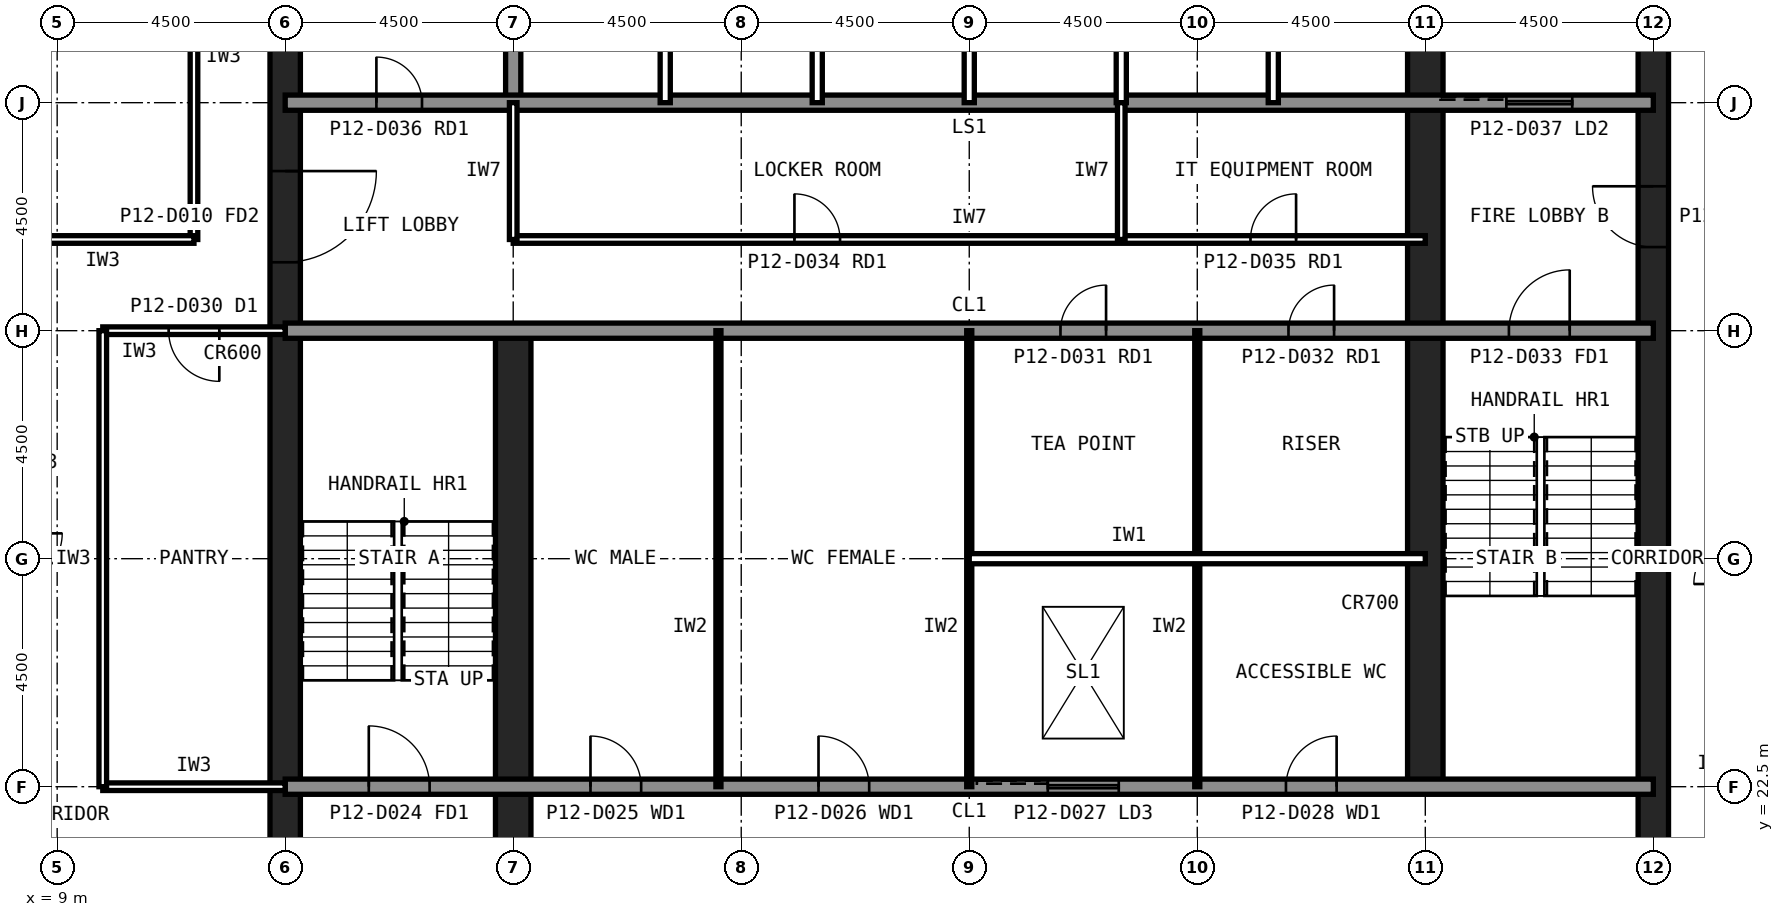
"""IFC4 building model, lengths in metres.
Left out: names, types, materials, properties, quantities, classifications, styles, units other than length and angle.
Written with IfcOpenShell. Run it as: python <this file> out.ifc"""

import sys

from ifc_helpers import new_model, si_unit, direction, frame, frame_2d, origin, place, context, subcontext, project, spatial, rectangle, extrude, element, fill, save


model = new_model("IFC4")
c1 = context("Model", 3, precision=1e-05, world=origin(), true_north=direction((0.0, 1.0)))
c2 = subcontext(c1, "Body", "Model", "MODEL_VIEW")
j1 = project(units=[si_unit("LENGTHUNIT", "METRE"), si_unit("PLANEANGLEUNIT", "RADIAN")], contexts=[c1])
p1 = place(None, origin())
s1 = spatial("IfcSite", under=j1, at=p1, CompositionType="ELEMENT")
p2 = place(p1, origin())
s2 = spatial("IfcBuilding", under=s1, at=p2, CompositionType="ELEMENT")
p3 = place(p2, frame((0.0, 0.0, 54.2)))
s3 = spatial("IfcBuildingStorey", under=s2, at=p3, CompositionType="ELEMENT", Elevation=54.2)
p4 = place(p3, frame((40.5, 13.5, 0.0), z_axis=(0.0, 0.0, 1.0), x_axis=(0.0, 1.0, 0.0)))
e1 = element("IfcWall", 1, at=p4, inside=s3, PredefinedType="SHEAR", context=c2, shape_type="SweptSolid", body=[
    extrude(rectangle(XDim=27.0, YDim=0.6, at=frame_2d((13.5, 0.0))), origin(), (0.0, 0.0, 1.0), 4.2),
])
p5 = place(p4, frame((5.85, 0.0, 0.0)))
e2 = element("IfcOpeningElement", 2, at=p5, cuts=e1, PredefinedType="OPENING", context=c2, shape_type="SweptSolid", body=[
    extrude(rectangle(XDim=1.8, YDim=2.1, at=frame_2d((0.9, 1.05))), frame((0.0, 0.31, 0.0), z_axis=(0.0, -1.0, 0.0), x_axis=(1.0, 0.0, 0.0)), (0.0, 0.0, 1.0), 0.62),
])
p6 = place(p4, frame((19.65, 0.0, 0.0)))
e3 = element("IfcOpeningElement", 3, at=p6, cuts=e1, PredefinedType="OPENING", context=c2, shape_type="SweptSolid", body=[
    extrude(rectangle(XDim=1.2, YDim=2.1, at=frame_2d((0.6, 1.05))), frame((0.0, 0.31, 0.0), z_axis=(0.0, -1.0, 0.0), x_axis=(1.0, 0.0, 0.0)), (0.0, 0.0, 1.0), 0.62),
])
p7 = place(p3, frame((13.5, 40.5, 0.0), z_axis=(0.0, 0.0, 1.0), x_axis=(0.0, -1.0, 0.0)))
e4 = element("IfcWall", 4, at=p7, inside=s3, PredefinedType="SHEAR", context=c2, shape_type="SweptSolid", body=[
    extrude(rectangle(XDim=27.0, YDim=0.6, at=frame_2d((13.5, 0.0))), origin(), (0.0, 0.0, 1.0), 4.2),
])
p8 = place(p7, frame((19.65, 0.0, 0.0)))
e5 = element("IfcOpeningElement", 5, at=p8, cuts=e4, PredefinedType="OPENING", context=c2, shape_type="SweptSolid", body=[
    extrude(rectangle(XDim=1.2, YDim=2.1, at=frame_2d((0.6, 1.05))), frame((0.0, 0.31, 0.0), z_axis=(0.0, -1.0, 0.0), x_axis=(1.0, 0.0, 0.0)), (0.0, 0.0, 1.0), 0.62),
])
p9 = place(p7, frame((5.85, 0.0, 0.0)))
e6 = element("IfcOpeningElement", 6, at=p9, cuts=e4, PredefinedType="OPENING", context=c2, shape_type="SweptSolid", body=[
    extrude(rectangle(XDim=1.8, YDim=2.1, at=frame_2d((0.9, 1.05))), frame((0.0, 0.31, 0.0), z_axis=(0.0, -1.0, 0.0), x_axis=(1.0, 0.0, 0.0)), (0.0, 0.0, 1.0), 0.62),
])
p10 = place(p3, frame((18.0, 13.5, 0.0), z_axis=(0.0, 0.0, 1.0), x_axis=(0.0, 1.0, 0.0)))
e7 = element("IfcWall", 7, at=p10, inside=s3, PredefinedType="SHEAR", context=c2, shape_type="SweptSolid", body=[
    extrude(rectangle(XDim=18.0, YDim=0.7, at=frame_2d((9.0, 0.0))), origin(), (0.0, 0.0, 1.0), 4.2),
])
p11 = place(p3, frame((18.0, 36.0, 0.0), z_axis=(0.0, 0.0, 1.0), x_axis=(0.0, 1.0, 0.0)))
e8 = element("IfcWall", 8, at=p11, inside=s3, PredefinedType="SOLIDWALL", context=c2, shape_type="SweptSolid", body=[
    extrude(rectangle(XDim=4.5, YDim=0.3, at=frame_2d((2.25, 0.0))), origin(), (0.0, 0.0, 1.0), 4.04),
])
p12 = place(p3, frame((36.0, 22.5, 0.0), z_axis=(0.0, 0.0, 1.0), x_axis=(0.0, 1.0, 0.0)))
e9 = element("IfcWall", 9, at=p12, inside=s3, PredefinedType="SHEAR", context=c2, shape_type="SweptSolid", body=[
    extrude(rectangle(XDim=18.0, YDim=0.7, at=frame_2d((9.0, 0.0))), origin(), (0.0, 0.0, 1.0), 4.2),
])
p13 = place(p3, frame((13.5, 36.0, 0.0), z_axis=(0.0, 0.0, 1.0), x_axis=(1.0, 0.0, 0.0)))
e10 = element("IfcWall", 10, at=p13, inside=s3, PredefinedType="SOLIDWALL", context=c2, shape_type="SweptSolid", body=[
    extrude(rectangle(XDim=27.0, YDim=0.3, at=frame_2d((13.5, 0.0))), origin(), (0.0, 0.0, 1.0), 4.04),
])
p14 = place(p13, frame((1.8, 0.0, 0.0)))
e11 = element("IfcOpeningElement", 11, at=p14, cuts=e10, PredefinedType="OPENING", context=c2, shape_type="SweptSolid", body=[
    extrude(rectangle(XDim=0.9, YDim=2.1, at=frame_2d((0.45, 1.05))), frame((0.0, 0.16, 0.0), z_axis=(0.0, -1.0, 0.0), x_axis=(1.0, 0.0, 0.0)), (0.0, 0.0, 1.0), 0.32),
])
p15 = place(p13, frame((24.1, 0.0, 0.0)))
e12 = element("IfcOpeningElement", 12, at=p15, cuts=e10, PredefinedType="OPENING", context=c2, shape_type="SweptSolid", body=[
    extrude(rectangle(XDim=1.3, YDim=2.2, at=frame_2d((0.65, 1.1))), frame((0.0, 0.16, 0.0), z_axis=(0.0, -1.0, 0.0), x_axis=(1.0, 0.0, 0.0)), (0.0, 0.0, 1.0), 0.32),
])
p16 = place(p3, frame((13.5, 22.5, 0.0), z_axis=(0.0, 0.0, 1.0), x_axis=(1.0, 0.0, 0.0)))
e13 = element("IfcWall", 13, at=p16, inside=s3, PredefinedType="SOLIDWALL", context=c2, shape_type="SweptSolid", body=[
    extrude(rectangle(XDim=27.0, YDim=0.3, at=frame_2d((13.5, 0.0))), origin(), (0.0, 0.0, 1.0), 4.04),
])
p17 = place(p16, frame((1.65, 0.0, 0.0)))
e14 = element("IfcOpeningElement", 14, at=p17, cuts=e13, PredefinedType="OPENING", context=c2, shape_type="SweptSolid", body=[
    extrude(rectangle(XDim=1.2, YDim=2.1, at=frame_2d((0.6, 1.05))), frame((0.0, 0.16, 0.0), z_axis=(0.0, -1.0, 0.0), x_axis=(1.0, 0.0, 0.0)), (0.0, 0.0, 1.0), 0.32),
])
p18 = place(p16, frame((6.025, 0.0, 0.0)))
e15 = element("IfcOpeningElement", 15, at=p18, cuts=e13, PredefinedType="OPENING", context=c2, shape_type="SweptSolid", body=[
    extrude(rectangle(XDim=1.0, YDim=2.1, at=frame_2d((0.5, 1.05))), frame((0.0, 0.16, 0.0), z_axis=(0.0, -1.0, 0.0), x_axis=(1.0, 0.0, 0.0)), (0.0, 0.0, 1.0), 0.32),
])
p19 = place(p16, frame((10.525, 0.0, 0.0)))
e16 = element("IfcOpeningElement", 16, at=p19, cuts=e13, PredefinedType="OPENING", context=c2, shape_type="SweptSolid", body=[
    extrude(rectangle(XDim=1.0, YDim=2.1, at=frame_2d((0.5, 1.05))), frame((0.0, 0.16, 0.0), z_axis=(0.0, -1.0, 0.0), x_axis=(1.0, 0.0, 0.0)), (0.0, 0.0, 1.0), 0.32),
])
p20 = place(p16, frame((19.75, 0.0, 0.0)))
e17 = element("IfcOpeningElement", 17, at=p20, cuts=e13, PredefinedType="OPENING", context=c2, shape_type="SweptSolid", body=[
    extrude(rectangle(XDim=1.0, YDim=2.1, at=frame_2d((0.5, 1.05))), frame((0.0, 0.16, 0.0), z_axis=(0.0, -1.0, 0.0), x_axis=(1.0, 0.0, 0.0)), (0.0, 0.0, 1.0), 0.32),
])
p21 = place(p16, frame((15.05, 0.0, 0.0)))
e18 = element("IfcOpeningElement", 18, at=p21, cuts=e13, PredefinedType="OPENING", context=c2, shape_type="SweptSolid", body=[
    extrude(rectangle(XDim=1.4, YDim=2.4, at=frame_2d((0.7, 1.2))), frame((0.0, 0.16, 0.0), z_axis=(0.0, -1.0, 0.0), x_axis=(1.0, 0.0, 0.0)), (0.0, 0.0, 1.0), 0.32),
])
p22 = place(p3, frame((13.5, 31.5, 0.0), z_axis=(0.0, 0.0, 1.0), x_axis=(1.0, 0.0, 0.0)))
e19 = element("IfcWall", 19, at=p22, inside=s3, PredefinedType="SOLIDWALL", context=c2, shape_type="SweptSolid", body=[
    extrude(rectangle(XDim=27.0, YDim=0.3, at=frame_2d((13.5, 0.0))), origin(), (0.0, 0.0, 1.0), 4.04),
])
p23 = place(p22, frame((24.15, 0.0, 0.0)))
e20 = element("IfcOpeningElement", 20, at=p23, cuts=e19, PredefinedType="OPENING", context=c2, shape_type="SweptSolid", body=[
    extrude(rectangle(XDim=1.2, YDim=2.1, at=frame_2d((0.6, 1.05))), frame((0.0, 0.16, 0.0), z_axis=(0.0, -1.0, 0.0), x_axis=(1.0, 0.0, 0.0)), (0.0, 0.0, 1.0), 0.32),
])
p24 = place(p22, frame((15.3, 0.0, 0.0)))
e21 = element("IfcOpeningElement", 21, at=p24, cuts=e19, PredefinedType="OPENING", context=c2, shape_type="SweptSolid", body=[
    extrude(rectangle(XDim=0.9, YDim=2.1, at=frame_2d((0.45, 1.05))), frame((0.0, 0.16, 0.0), z_axis=(0.0, -1.0, 0.0), x_axis=(1.0, 0.0, 0.0)), (0.0, 0.0, 1.0), 0.32),
])
p25 = place(p22, frame((19.8, 0.0, 0.0)))
e22 = element("IfcOpeningElement", 22, at=p25, cuts=e19, PredefinedType="OPENING", context=c2, shape_type="SweptSolid", body=[
    extrude(rectangle(XDim=0.9, YDim=2.1, at=frame_2d((0.45, 1.05))), frame((0.0, 0.16, 0.0), z_axis=(0.0, -1.0, 0.0), x_axis=(1.0, 0.0, 0.0)), (0.0, 0.0, 1.0), 0.32),
])
for number, where, z_axis, x_axis in (
    (23, (21.0, 36.0, 0.0), (0.0, 0.0, 1.0), (0.0, 1.0, 0.0)),
    (24, (24.0, 36.0, 0.0), (0.0, 0.0, 1.0), (0.0, 1.0, 0.0)),
    (25, (27.0, 36.0, 0.0), (0.0, 0.0, 1.0), (0.0, 1.0, 0.0)),
    (26, (30.0, 36.0, 0.0), (0.0, 0.0, 1.0), (0.0, 1.0, 0.0)),
    (27, (33.0, 36.0, 0.0), (0.0, 0.0, 1.0), (0.0, 1.0, 0.0)),
):
    element("IfcWall", number, at=place(p3, frame(where, z_axis=z_axis, x_axis=x_axis)), inside=s3, PredefinedType="PARTITIONING", context=c2, shape_type="SweptSolid", body=[
        extrude(rectangle(XDim=4.5, YDim=0.2, at=frame_2d((2.25, 0.0))), origin(), (0.0, 0.0, 1.0), 4.04),
    ])
for number, where, z_axis, x_axis in (
    (28, (22.05, 22.5, 0.0), (0.0, 0.0, 1.0), (0.0, 1.0, 0.0)),
    (29, (27.0, 22.5, 0.0), (0.0, 0.0, 1.0), (0.0, 1.0, 0.0)),
    (30, (31.5, 22.5, 0.0), (0.0, 0.0, 1.0), (0.0, 1.0, 0.0)),
):
    element("IfcWall", number, at=place(p3, frame(where, z_axis=z_axis, x_axis=x_axis)), inside=s3, PredefinedType="PLUMBINGWALL", context=c2, shape_type="SweptSolid", body=[
        extrude(rectangle(XDim=9.0, YDim=0.1, at=frame_2d((4.5, 0.0))), origin(), (0.0, 0.0, 1.0), 4.04),
    ])
p26 = place(p3, frame((27.0, 27.0, 0.0), z_axis=(0.0, 0.0, 1.0), x_axis=(1.0, 0.0, 0.0)))
e31 = element("IfcWall", 31, at=p26, inside=s3, PredefinedType="PARTITIONING", context=c2, shape_type="SweptSolid", body=[
    extrude(rectangle(XDim=9.0, YDim=0.2, at=frame_2d((4.5, 0.0))), origin(), (0.0, 0.0, 1.0), 4.04),
])
p27 = place(p3, frame((18.0, 33.3, 0.0), z_axis=(0.0, 0.0, 1.0), x_axis=(1.0, 0.0, 0.0)))
e32 = element("IfcWall", 32, at=p27, inside=s3, PredefinedType="PARTITIONING", context=c2, shape_type="SweptSolid", body=[
    extrude(rectangle(XDim=18.0, YDim=0.15, at=frame_2d((9.0, 0.0))), origin(), (0.0, 0.0, 1.0), 4.04),
])
p28 = place(p27, frame((5.55, 0.0, 0.0)))
e33 = element("IfcOpeningElement", 33, at=p28, cuts=e32, PredefinedType="OPENING", context=c2, shape_type="SweptSolid", body=[
    extrude(rectangle(XDim=0.9, YDim=2.1, at=frame_2d((0.45, 1.05))), frame((0.0, 0.085, 0.0), z_axis=(0.0, -1.0, 0.0), x_axis=(1.0, 0.0, 0.0)), (0.0, 0.0, 1.0), 0.17),
])
p29 = place(p27, frame((14.55, 0.0, 0.0)))
e34 = element("IfcOpeningElement", 34, at=p29, cuts=e32, PredefinedType="OPENING", context=c2, shape_type="SweptSolid", body=[
    extrude(rectangle(XDim=0.9, YDim=2.1, at=frame_2d((0.45, 1.05))), frame((0.0, 0.085, 0.0), z_axis=(0.0, -1.0, 0.0), x_axis=(1.0, 0.0, 0.0)), (0.0, 0.0, 1.0), 0.17),
])
for number, where, z_axis, x_axis in (
    (35, (18.0, 33.3, 0.0), (0.0, 0.0, 1.0), (0.0, 1.0, 0.0)),
    (36, (30.0, 33.3, 0.0), (0.0, 0.0, 1.0), (0.0, 1.0, 0.0)),
):
    element("IfcWall", number, at=place(p3, frame(where, z_axis=z_axis, x_axis=x_axis)), inside=s3, PredefinedType="PARTITIONING", context=c2, shape_type="SweptSolid", body=[
        extrude(rectangle(XDim=2.7, YDim=0.15, at=frame_2d((1.35, 0.0))), origin(), (0.0, 0.0, 1.0), 4.04),
    ])
p30 = place(p3, frame((11.7, 40.5, 0.0), z_axis=(0.0, 0.0, 1.0), x_axis=(0.0, -1.0, 0.0)))
e37 = element("IfcWall", 37, at=p30, inside=s3, PredefinedType="PARTITIONING", context=c2, shape_type="SweptSolid", body=[
    extrude(rectangle(XDim=7.2, YDim=0.15, at=frame_2d((3.6, 0.0))), origin(), (0.0, 0.0, 1.0), 4.04),
])
p31 = place(p3, frame((11.7, 33.3, 0.0), z_axis=(0.0, 0.0, 1.0), x_axis=(-1.0, 0.0, 0.0)))
e38 = element("IfcWall", 38, at=p31, inside=s3, PredefinedType="PARTITIONING", context=c2, shape_type="SweptSolid", body=[
    extrude(rectangle(XDim=3.6, YDim=0.15, at=frame_2d((1.8, 0.0))), origin(), (0.0, 0.0, 1.0), 4.04),
])
p32 = place(p3, frame((9.9, 22.5, 0.0), z_axis=(0.0, 0.0, 1.0), x_axis=(1.0, 0.0, 0.0)))
e39 = element("IfcWall", 39, at=p32, inside=s3, PredefinedType="PARTITIONING", context=c2, shape_type="SweptSolid", body=[
    extrude(rectangle(XDim=3.6, YDim=0.15, at=frame_2d((1.8, 0.0))), origin(), (0.0, 0.0, 1.0), 3.189),
])
p33 = place(p3, frame((13.5, 31.5, 0.0), z_axis=(0.0, 0.0, 1.0), x_axis=(-1.0, 0.0, 0.0)))
e40 = element("IfcWall", 40, at=p33, inside=s3, PredefinedType="PARTITIONING", context=c2, shape_type="SweptSolid", body=[
    extrude(rectangle(XDim=3.6, YDim=0.15, at=frame_2d((1.8, 0.0))), origin(), (0.0, 0.0, 1.0), 3.189),
])
p34 = place(p33, frame((1.3, 0.0, 0.0)))
e41 = element("IfcOpeningElement", 41, at=p34, cuts=e40, PredefinedType="OPENING", context=c2, shape_type="SweptSolid", body=[
    extrude(rectangle(XDim=1.0, YDim=2.1, at=frame_2d((0.5, 1.05))), frame((0.0, 0.085, 0.0), z_axis=(0.0, -1.0, 0.0), x_axis=(1.0, 0.0, 0.0)), (0.0, 0.0, 1.0), 0.17),
])
p35 = place(p3, frame((9.9, 31.5, 0.0), z_axis=(0.0, 0.0, 1.0), x_axis=(0.0, -1.0, 0.0)))
e42 = element("IfcWall", 42, at=p35, inside=s3, PredefinedType="PARTITIONING", context=c2, shape_type="SweptSolid", body=[
    extrude(rectangle(XDim=9.0, YDim=0.15, at=frame_2d((4.5, 0.0))), origin(), (0.0, 0.0, 1.0), 4.04),
])
p36 = place(p9, origin())
e43 = element("IfcDoor", 43, at=p36, inside=s3, OperationType="SINGLE_SWING_LEFT", PredefinedType="DOOR", context=c2, shape_type="SweptSolid", body=[
    extrude(rectangle(XDim=1.8, YDim=2.1, at=frame_2d((0.9, 1.05))), frame((0.0, 0.025, 0.0), z_axis=(0.0, -1.0, 0.0), x_axis=(1.0, 0.0, 0.0)), (0.0, 0.0, 1.0), 0.05),
])
fill(e6, e43)
p37 = place(p6, origin())
e44 = element("IfcDoor", 44, at=p37, inside=s3, OperationType="SINGLE_SWING_RIGHT", PredefinedType="DOOR", context=c2, shape_type="SweptSolid", body=[
    extrude(rectangle(XDim=1.2, YDim=2.1, at=frame_2d((0.6, 1.05))), frame((0.0, 0.025, 0.0), z_axis=(0.0, -1.0, 0.0), x_axis=(1.0, 0.0, 0.0)), (0.0, 0.0, 1.0), 0.05),
])
fill(e3, e44)
p38 = place(p17, origin())
e45 = element("IfcDoor", 45, at=p38, inside=s3, OperationType="SINGLE_SWING_LEFT", PredefinedType="DOOR", context=c2, shape_type="SweptSolid", body=[
    extrude(rectangle(XDim=1.2, YDim=2.1, at=frame_2d((0.6, 1.05))), frame((0.0, 0.025, 0.0), z_axis=(0.0, -1.0, 0.0), x_axis=(1.0, 0.0, 0.0)), (0.0, 0.0, 1.0), 0.05),
])
fill(e14, e45)
p39 = place(p23, origin())
e46 = element("IfcDoor", 46, at=p39, inside=s3, OperationType="SINGLE_SWING_RIGHT", PredefinedType="DOOR", context=c2, shape_type="SweptSolid", body=[
    extrude(rectangle(XDim=1.2, YDim=2.1, at=frame_2d((0.6, 1.05))), frame((0.0, 0.025, 0.0), z_axis=(0.0, -1.0, 0.0), x_axis=(1.0, 0.0, 0.0)), (0.0, 0.0, 1.0), 0.05),
])
fill(e20, e46)
p40 = place(p18, origin())
e47 = element("IfcDoor", 47, at=p40, inside=s3, OperationType="SINGLE_SWING_LEFT", PredefinedType="DOOR", context=c2, shape_type="SweptSolid", body=[
    extrude(rectangle(XDim=1.0, YDim=2.1, at=frame_2d((0.5, 1.05))), frame((0.0, 0.025, 0.0), z_axis=(0.0, -1.0, 0.0), x_axis=(1.0, 0.0, 0.0)), (0.0, 0.0, 1.0), 0.05),
])
fill(e15, e47)
p41 = place(p19, origin())
e48 = element("IfcDoor", 48, at=p41, inside=s3, OperationType="SINGLE_SWING_LEFT", PredefinedType="DOOR", context=c2, shape_type="SweptSolid", body=[
    extrude(rectangle(XDim=1.0, YDim=2.1, at=frame_2d((0.5, 1.05))), frame((0.0, 0.025, 0.0), z_axis=(0.0, -1.0, 0.0), x_axis=(1.0, 0.0, 0.0)), (0.0, 0.0, 1.0), 0.05),
])
fill(e16, e48)
p42 = place(p20, origin())
e49 = element("IfcDoor", 49, at=p42, inside=s3, OperationType="SINGLE_SWING_RIGHT", PredefinedType="DOOR", context=c2, shape_type="SweptSolid", body=[
    extrude(rectangle(XDim=1.0, YDim=2.1, at=frame_2d((0.5, 1.05))), frame((0.0, 0.025, 0.0), z_axis=(0.0, -1.0, 0.0), x_axis=(1.0, 0.0, 0.0)), (0.0, 0.0, 1.0), 0.05),
])
fill(e17, e49)
p43 = place(p24, origin())
e50 = element("IfcDoor", 50, at=p43, inside=s3, OperationType="SINGLE_SWING_RIGHT", PredefinedType="DOOR", context=c2, shape_type="SweptSolid", body=[
    extrude(rectangle(XDim=0.9, YDim=2.1, at=frame_2d((0.45, 1.05))), frame((0.0, 0.025, 0.0), z_axis=(0.0, -1.0, 0.0), x_axis=(1.0, 0.0, 0.0)), (0.0, 0.0, 1.0), 0.05),
])
fill(e21, e50)
p44 = place(p25, origin())
e51 = element("IfcDoor", 51, at=p44, inside=s3, OperationType="SINGLE_SWING_RIGHT", PredefinedType="DOOR", context=c2, shape_type="SweptSolid", body=[
    extrude(rectangle(XDim=0.9, YDim=2.1, at=frame_2d((0.45, 1.05))), frame((0.0, 0.025, 0.0), z_axis=(0.0, -1.0, 0.0), x_axis=(1.0, 0.0, 0.0)), (0.0, 0.0, 1.0), 0.05),
])
fill(e22, e51)
p45 = place(p14, origin())
e52 = element("IfcDoor", 52, at=p45, inside=s3, OperationType="SINGLE_SWING_LEFT", PredefinedType="DOOR", context=c2, shape_type="SweptSolid", body=[
    extrude(rectangle(XDim=0.9, YDim=2.1, at=frame_2d((0.45, 1.05))), frame((0.0, 0.025, 0.0), z_axis=(0.0, -1.0, 0.0), x_axis=(1.0, 0.0, 0.0)), (0.0, 0.0, 1.0), 0.05),
])
fill(e11, e52)
p46 = place(p28, origin())
e53 = element("IfcDoor", 53, at=p46, inside=s3, OperationType="SINGLE_SWING_LEFT", PredefinedType="DOOR", context=c2, shape_type="SweptSolid", body=[
    extrude(rectangle(XDim=0.9, YDim=2.1, at=frame_2d((0.45, 1.05))), frame((0.0, 0.025, 0.0), z_axis=(0.0, -1.0, 0.0), x_axis=(1.0, 0.0, 0.0)), (0.0, 0.0, 1.0), 0.05),
])
fill(e33, e53)
p47 = place(p29, origin())
e54 = element("IfcDoor", 54, at=p47, inside=s3, OperationType="SINGLE_SWING_RIGHT", PredefinedType="DOOR", context=c2, shape_type="SweptSolid", body=[
    extrude(rectangle(XDim=0.9, YDim=2.1, at=frame_2d((0.45, 1.05))), frame((0.0, 0.025, 0.0), z_axis=(0.0, -1.0, 0.0), x_axis=(1.0, 0.0, 0.0)), (0.0, 0.0, 1.0), 0.05),
])
fill(e34, e54)
p48 = place(p15, origin())
e55 = element("IfcDoor", 55, at=p48, inside=s3, OperationType="SLIDING_TO_LEFT", PredefinedType="DOOR", context=c2, shape_type="SweptSolid", body=[
    extrude(rectangle(XDim=1.3, YDim=2.2, at=frame_2d((0.65, 1.1))), frame((0.0, 0.025, 0.0), z_axis=(0.0, -1.0, 0.0), x_axis=(1.0, 0.0, 0.0)), (0.0, 0.0, 1.0), 0.05),
])
fill(e12, e55)
p49 = place(p21, origin())
e56 = element("IfcDoor", 56, at=p49, inside=s3, OperationType="SLIDING_TO_LEFT", PredefinedType="DOOR", context=c2, shape_type="SweptSolid", body=[
    extrude(rectangle(XDim=1.4, YDim=2.4, at=frame_2d((0.7, 1.2))), frame((0.0, 0.025, 0.0), z_axis=(0.0, -1.0, 0.0), x_axis=(1.0, 0.0, 0.0)), (0.0, 0.0, 1.0), 0.05),
])
fill(e18, e56)
p50 = place(p34, origin())
e57 = element("IfcDoor", 57, at=p50, inside=s3, OperationType="SINGLE_SWING_LEFT", PredefinedType="DOOR", context=c2, shape_type="SweptSolid", body=[
    extrude(rectangle(XDim=1.0, YDim=2.1, at=frame_2d((0.5, 1.05))), frame((0.0, 0.025, 0.0), z_axis=(0.0, -1.0, 0.0), x_axis=(1.0, 0.0, 0.0)), (0.0, 0.0, 1.0), 0.05),
])
fill(e41, e57)
save(model, sys.argv[1])
